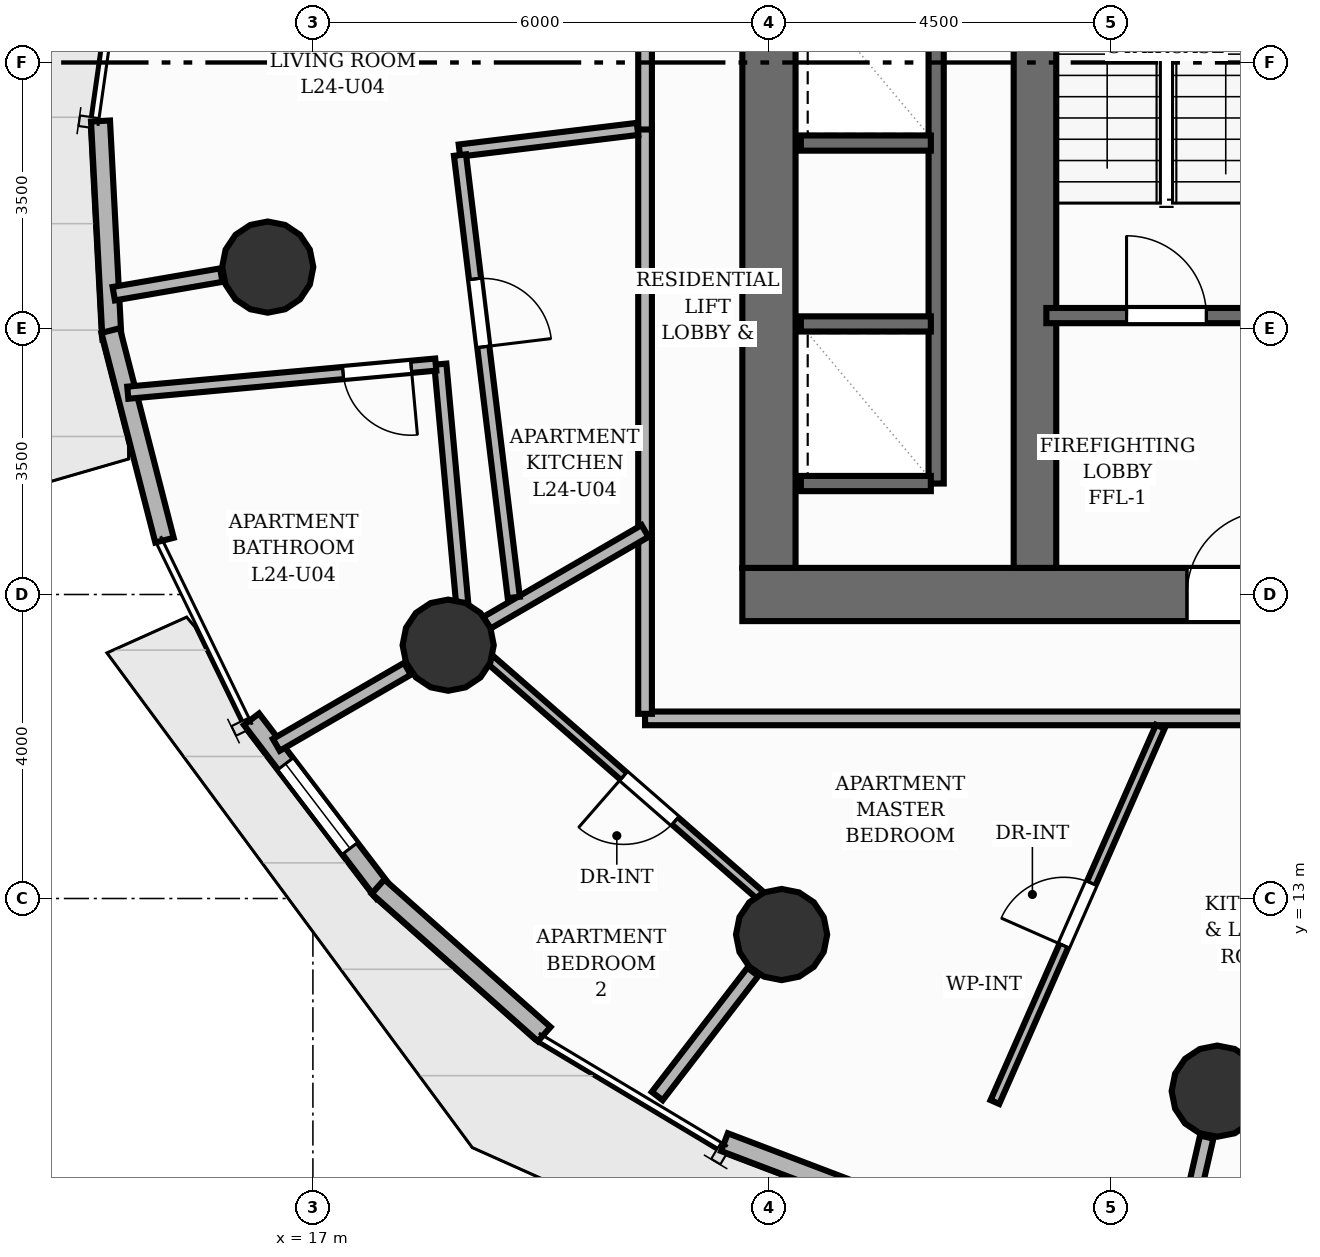
"""IFC4 building model, lengths in metres.
Left out: names, types, materials, properties, quantities, classifications, styles, units other than length and angle.
Written with IfcOpenShell. Run it as: python <this file> out.ifc"""

import sys

from ifc_helpers import new_model, si_unit, direction, frame, frame_2d, origin, origin_2d, place, context, subcontext, project, spatial, rectangle, circle, extrude, element, fill, save


model = new_model("IFC4")
c1 = context("Model", 3, precision=1e-05, world=origin(), true_north=direction((0.0, 1.0)))
c2 = subcontext(c1, "Body", "Model", "MODEL_VIEW")
j1 = project(units=[si_unit("LENGTHUNIT", "METRE"), si_unit("PLANEANGLEUNIT", "RADIAN")], contexts=[c1])
p1 = place(None, origin())
s1 = spatial("IfcSite", under=j1, at=p1, CompositionType="ELEMENT")
p2 = place(p1, origin())
s2 = spatial("IfcBuilding", under=s1, at=p2, CompositionType="ELEMENT")
p3 = place(p2, frame((0.0, 0.0, 83.68)))
s3 = spatial("IfcBuildingStorey", under=s2, at=p3, CompositionType="ELEMENT", Elevation=83.68)
p4 = place(p3, frame((22.65, 17.0, 0.0), z_axis=(0.0, 0.0, 1.0), x_axis=(1.0, 0.0, 0.0)))
e1 = element("IfcWall", 1, at=p4, inside=s3, PredefinedType="SHEAR", context=c2, shape_type="SweptSolid", body=[
    extrude(rectangle(XDim=18.7, YDim=0.7, at=frame_2d((9.35, 0.0))), origin(), (0.0, 0.0, 1.0), 3.2),
])
p5 = place(p4, frame((5.85, 0.0, 0.0)))
e2 = element("IfcOpeningElement", 2, at=p5, cuts=e1, PredefinedType="OPENING", context=c2, shape_type="SweptSolid", body=[
    extrude(rectangle(XDim=1.1, YDim=2.15, at=frame_2d((0.55, 1.075))), frame((0.0, 0.36, 0.0), z_axis=(0.0, -1.0, 0.0), x_axis=(1.0, 0.0, 0.0)), (0.0, 0.0, 1.0), 0.72),
])
p6 = place(p4, frame((9.4, 0.0, 0.0)))
e3 = element("IfcOpeningElement", 3, at=p6, cuts=e1, PredefinedType="OPENING", context=c2, shape_type="SweptSolid", body=[
    extrude(rectangle(XDim=0.9, YDim=2.1, at=frame_2d((0.45, 1.05))), frame((0.0, 0.36, 0.0), z_axis=(0.0, -1.0, 0.0), x_axis=(1.0, 0.0, 0.0)), (0.0, 0.0, 1.0), 0.72),
])
p7 = place(p3, frame((23.0, 17.35, 0.0), z_axis=(0.0, 0.0, 1.0), x_axis=(0.0, 1.0, 0.0)))
e4 = element("IfcWall", 4, at=p7, inside=s3, PredefinedType="SHEAR", context=c2, shape_type="SweptSolid", body=[
    extrude(rectangle(XDim=13.3, YDim=0.7, at=frame_2d((6.65, 0.0))), origin(), (0.0, 0.0, 1.0), 3.2),
])
p8 = place(p3, frame((26.5, 17.35, 0.0), z_axis=(0.0, 0.0, 1.0), x_axis=(0.0, 1.0, 0.0)))
e5 = element("IfcWall", 5, at=p8, inside=s3, PredefinedType="SHEAR", context=c2, shape_type="SweptSolid", body=[
    extrude(rectangle(XDim=13.3, YDim=0.56, at=frame_2d((6.65, 0.0))), origin(), (0.0, 0.0, 1.0), 3.2),
])
for number, where, z_axis, x_axis in (
    (6, (16.406, 21.308, 0.0), (0.0, 0.0, 1.0), (1.0, 0.0, 0.0)),
    (7, (18.78, 16.333, 0.0), (0.0, 0.0, 1.0), (1.0, 0.0, 0.0)),
    (8, (23.167, 12.526, 0.0), (0.0, 0.0, 1.0), (1.0, 0.0, 0.0)),
    (9, (28.898, 10.465, 0.0), (0.0, 0.0, 1.0), (1.0, 0.0, 0.0)),
):
    element("IfcColumn", number, at=place(p3, frame(where, z_axis=z_axis, x_axis=x_axis)), inside=s3, PredefinedType="COLUMN", context=c2, shape_type="SweptSolid", body=[
        extrude(circle(Radius=0.6, at=origin_2d()), origin(), (0.0, 0.0, 1.0), 3.2),
    ])
p9 = place(p3, frame((14.356, 20.36, 0.0), z_axis=(0.0, 0.0, 1.0), x_axis=(-0.052411702269, 0.998625562193, 0.0)))
e10 = element("IfcWall", 10, at=p9, inside=s3, PredefinedType="SOLIDWALL", context=c2, shape_type="SweptSolid", body=[
    extrude(rectangle(XDim=2.874, YDim=0.25, at=frame_2d((1.437, 0.0))), origin(), (0.0, 0.0, 1.0), 2.96),
])
p10 = place(p3, frame((15.047, 17.715, 0.0), z_axis=(0.0, 0.0, 1.0), x_axis=(-0.248825035787, 0.96854845081, 0.0)))
e11 = element("IfcWall", 11, at=p10, inside=s3, PredefinedType="SOLIDWALL", context=c2, shape_type="SweptSolid", body=[
    extrude(rectangle(XDim=2.847, YDim=0.25, at=frame_2d((1.424, 0.0))), origin(), (0.0, 0.0, 1.0), 2.96),
])
p11 = place(p3, frame((17.935, 13.073, 0.0), z_axis=(0.0, 0.0, 1.0), x_axis=(-0.606166055027, 0.795338112838, 0.0)))
e12 = element("IfcWall", 12, at=p11, inside=s3, PredefinedType="SOLIDWALL", context=c2, shape_type="SweptSolid", body=[
    extrude(rectangle(XDim=2.874, YDim=0.25, at=frame_2d((1.437, 0.0))), origin(), (0.0, 0.0, 1.0), 2.96),
])
p12 = place(p11, frame((0.737, 0.0, 0.85)))
e13 = element("IfcOpeningElement", 13, at=p12, cuts=e12, PredefinedType="OPENING", context=c2, shape_type="SweptSolid", body=[
    extrude(rectangle(XDim=1.4, YDim=1.37, at=frame_2d((0.7, 0.685))), frame((0.0, 0.135, 0.0), z_axis=(0.0, -1.0, 0.0), x_axis=(1.0, 0.0, 0.0)), (0.0, 0.0, 1.0), 0.27),
])
p13 = place(p3, frame((20.043, 11.216, 0.0), z_axis=(0.0, 0.0, 1.0), x_axis=(-0.747828492436, 0.663891968547, 0.0)))
e14 = element("IfcWall", 14, at=p13, inside=s3, PredefinedType="SOLIDWALL", context=c2, shape_type="SweptSolid", body=[
    extrude(rectangle(XDim=2.923, YDim=0.25, at=frame_2d((1.461, 0.0))), origin(), (0.0, 0.0, 1.0), 2.96),
])
p14 = place(p3, frame((25.276, 8.707, 0.0), z_axis=(0.0, 0.0, 1.0), x_axis=(-0.934815891493, 0.355132720277, 0.0)))
e15 = element("IfcWall", 15, at=p14, inside=s3, PredefinedType="SOLIDWALL", context=c2, shape_type="SweptSolid", body=[
    extrude(rectangle(XDim=3.061, YDim=0.25, at=frame_2d((1.53, 0.0))), origin(), (0.0, 0.0, 1.0), 2.96),
])
p15 = place(p3, frame((26.65, 20.67, 0.0), z_axis=(0.0, 0.0, 1.0), x_axis=(1.0, 0.0, 0.0)))
e16 = element("IfcWall", 16, at=p15, inside=s3, PredefinedType="SHEAR", context=c2, shape_type="SweptSolid", body=[
    extrude(rectangle(XDim=3.24, YDim=0.2, at=frame_2d((1.62, 0.0))), origin(), (0.0, 0.0, 1.0), 3.2),
])
p16 = place(p15, frame((1.055, 0.0, 0.0)))
e17 = element("IfcOpeningElement", 17, at=p16, cuts=e16, PredefinedType="OPENING", context=c2, shape_type="SweptSolid", body=[
    extrude(rectangle(XDim=1.05, YDim=2.15, at=frame_2d((0.525, 1.075))), frame((0.0, 0.11, 0.0), z_axis=(0.0, -1.0, 0.0), x_axis=(1.0, 0.0, 0.0)), (0.0, 0.0, 1.0), 0.22),
])
p17 = place(p3, frame((25.2, 18.46, 0.0), z_axis=(0.0, 0.0, 1.0), x_axis=(0.0, 1.0, 0.0)))
e18 = element("IfcWall", 18, at=p17, inside=s3, PredefinedType="SHEAR", context=c2, shape_type="SweptSolid", body=[
    extrude(rectangle(XDim=11.08, YDim=0.2, at=frame_2d((5.54, 0.0))), origin(), (0.0, 0.0, 1.0), 3.2),
])
for number, where, z_axis, x_axis in (
    (19, (23.42, 18.46, 0.0), (0.0, 0.0, 1.0), (1.0, 0.0, 0.0)),
    (20, (23.42, 20.56, 0.0), (0.0, 0.0, 1.0), (1.0, 0.0, 0.0)),
    (21, (23.42, 22.94, 0.0), (0.0, 0.0, 1.0), (1.0, 0.0, 0.0)),
):
    element("IfcWall", number, at=place(p3, frame(where, z_axis=z_axis, x_axis=x_axis)), inside=s3, PredefinedType="SHEAR", context=c2, shape_type="SweptSolid", body=[
        extrude(rectangle(XDim=1.71, YDim=0.2, at=frame_2d((0.855, 0.0))), origin(), (0.0, 0.0, 1.0), 3.2),
    ])
p18 = place(p3, frame((15.794, 21.202, 0.0), z_axis=(0.0, 0.0, 1.0), x_axis=(-0.985402123708, -0.170242928172, 0.0)))
e22 = element("IfcWall", 22, at=p18, inside=s3, PredefinedType="PARTITIONING", context=c2, shape_type="SweptSolid", body=[
    extrude(rectangle(XDim=1.436, YDim=0.18, at=frame_2d((0.718, 0.0))), origin(), (0.0, 0.0, 1.0), 2.261),
])
p19 = place(p3, frame((18.243, 16.022, 0.0), z_axis=(0.0, 0.0, 1.0), x_axis=(-0.865046065875, -0.501692439563, 0.0)))
e23 = element("IfcWall", 23, at=p19, inside=s3, PredefinedType="PARTITIONING", context=c2, shape_type="SweptSolid", body=[
    extrude(rectangle(XDim=1.994, YDim=0.18, at=frame_2d((0.997, 0.0))), origin(), (0.0, 0.0, 1.0), 2.261),
])
p20 = place(p3, frame((22.788, 12.034, 0.0), z_axis=(0.0, 0.0, 1.0), x_axis=(-0.609991040385, -0.792408310564, 0.0)))
e24 = element("IfcWall", 24, at=p20, inside=s3, PredefinedType="PARTITIONING", context=c2, shape_type="SweptSolid", body=[
    extrude(rectangle(XDim=2.062, YDim=0.18, at=frame_2d((1.031, 0.0))), origin(), (0.0, 0.0, 1.0), 2.261),
])
p21 = place(p3, frame((28.76, 9.861, 0.0), z_axis=(0.0, 0.0, 1.0), x_axis=(-0.223359217097, -0.974736200281, 0.0)))
e25 = element("IfcWall", 25, at=p21, inside=s3, PredefinedType="PARTITIONING", context=c2, shape_type="SweptSolid", body=[
    extrude(rectangle(XDim=1.712, YDim=0.18, at=frame_2d((0.856, 0.0))), origin(), (0.0, 0.0, 1.0), 2.261),
])
p22 = place(p3, frame((41.695, 15.37, 0.0), z_axis=(0.0, 0.0, 1.0), x_axis=(-1.0, 0.0, 0.0)))
e26 = element("IfcWall", 26, at=p22, inside=s3, PredefinedType="PARTITIONING", context=c2, shape_type="SweptSolid", body=[
    extrude(rectangle(XDim=20.325, YDim=0.18, at=frame_2d((10.163, 0.0))), origin(), (0.0, 0.0, 1.0), 2.955),
])
p23 = place(p22, frame((11.424, 0.0, 0.0)))
e27 = element("IfcOpeningElement", 27, at=p23, cuts=e26, PredefinedType="OPENING", context=c2, shape_type="SweptSolid", body=[
    extrude(rectangle(XDim=1.05, YDim=2.15, at=frame_2d((0.525, 1.075))), frame((0.0, 0.1, 0.0), z_axis=(0.0, -1.0, 0.0), x_axis=(1.0, 0.0, 0.0)), (0.0, 0.0, 1.0), 0.2),
])
p24 = place(p3, frame((21.37, 15.43, 0.0), z_axis=(0.0, 0.0, 1.0), x_axis=(0.0, 1.0, 0.0)))
e28 = element("IfcWall", 28, at=p24, inside=s3, PredefinedType="PARTITIONING", context=c2, shape_type="SweptSolid", body=[
    extrude(rectangle(XDim=7.727, YDim=0.18, at=frame_2d((3.863, 0.0))), origin(), (0.0, 0.0, 1.0), 2.955),
])
p25 = place(p3, frame((21.37, 23.118, 0.0), z_axis=(0.0, 0.0, 1.0), x_axis=(0.0, 1.0, 0.0)))
e29 = element("IfcWall", 29, at=p25, inside=s3, PredefinedType="PARTITIONING", context=c2, shape_type="SweptSolid", body=[
    extrude(rectangle(XDim=4.154, YDim=0.18, at=frame_2d((2.077, 0.0))), origin(), (0.0, 0.0, 1.0), 2.955),
])
p26 = place(p25, frame((1.552, 0.0, 0.0)))
e30 = element("IfcOpeningElement", 30, at=p26, cuts=e29, PredefinedType="OPENING", context=c2, shape_type="SweptSolid", body=[
    extrude(rectangle(XDim=1.05, YDim=2.15, at=frame_2d((0.525, 1.075))), frame((0.0, 0.1, 0.0), z_axis=(0.0, -1.0, 0.0), x_axis=(1.0, 0.0, 0.0)), (0.0, 0.0, 1.0), 0.2),
])
p27 = place(p3, frame((25.973, 10.322, 0.0), z_axis=(0.0, 0.0, 1.0), x_axis=(0.403235845427, 0.91509608947, 0.0)))
e31 = element("IfcWall", 31, at=p27, inside=s3, PredefinedType="PARTITIONING", context=c2, shape_type="SweptSolid", body=[
    extrude(rectangle(XDim=5.396, YDim=0.125, at=frame_2d((2.698, 0.0))), origin(), (0.0, 0.0, 1.0), 2.955),
])
p28 = place(p27, frame((2.248, 0.0, 0.0)))
e32 = element("IfcOpeningElement", 32, at=p28, cuts=e31, PredefinedType="OPENING", context=c2, shape_type="SweptSolid", body=[
    extrude(rectangle(XDim=0.9, YDim=2.1, at=frame_2d((0.45, 1.05))), frame((0.0, 0.073, 0.0), z_axis=(0.0, -1.0, 0.0), x_axis=(1.0, 0.0, 0.0)), (0.0, 0.0, 1.0), 0.145),
])
p29 = place(p3, frame((22.888, 13.04, 0.0), z_axis=(0.0, 0.0, 1.0), x_axis=(-0.753425123405, 0.657533712765, 0.0)))
e33 = element("IfcWall", 33, at=p29, inside=s3, PredefinedType="PARTITIONING", context=c2, shape_type="SweptSolid", body=[
    extrude(rectangle(XDim=4.72, YDim=0.125, at=frame_2d((2.36, 0.0))), origin(), (0.0, 0.0, 1.0), 2.404),
])
p30 = place(p29, frame((1.49, 0.0, 0.0)))
e34 = element("IfcOpeningElement", 34, at=p30, cuts=e33, PredefinedType="OPENING", context=c2, shape_type="SweptSolid", body=[
    extrude(rectangle(XDim=0.9, YDim=2.1, at=frame_2d((0.45, 1.05))), frame((0.0, 0.073, 0.0), z_axis=(0.0, -1.0, 0.0), x_axis=(1.0, 0.0, 0.0)), (0.0, 0.0, 1.0), 0.145),
])
p31 = place(p3, frame((19.288, 16.628, 0.0), z_axis=(0.0, 0.0, 1.0), x_axis=(0.86502326608, 0.501731750182, 0.0)))
e35 = element("IfcWall", 35, at=p31, inside=s3, PredefinedType="PARTITIONING", context=c2, shape_type="SweptSolid", body=[
    extrude(rectangle(XDim=2.407, YDim=0.18, at=frame_2d((1.204, 0.0))), origin(), (0.0, 0.0, 1.0), 2.261),
])
p32 = place(p3, frame((18.964, 16.887, 0.0), z_axis=(0.0, 0.0, 1.0), x_axis=(-0.091023836021, 0.995848714051, 0.0)))
e36 = element("IfcWall", 36, at=p32, inside=s3, PredefinedType="PLUMBINGWALL", context=c2, shape_type="SweptSolid", body=[
    extrude(rectangle(XDim=3.157, YDim=0.16, at=frame_2d((1.579, 0.0))), origin(), (0.0, 0.0, 1.0), 2.955),
])
p33 = place(p3, frame((18.616, 20.025, 0.0), z_axis=(0.0, 0.0, 1.0), x_axis=(-0.995848823867, -0.091022634561, 0.0)))
e37 = element("IfcWall", 37, at=p33, inside=s3, PredefinedType="PLUMBINGWALL", context=c2, shape_type="SweptSolid", body=[
    extrude(rectangle(XDim=4.069, YDim=0.16, at=frame_2d((2.034, 0.0))), origin(), (0.0, 0.0, 1.0), 2.641),
])
p34 = place(p33, frame((0.324, 0.0, 0.0)))
e38 = element("IfcOpeningElement", 38, at=p34, cuts=e37, PredefinedType="OPENING", context=c2, shape_type="SweptSolid", body=[
    extrude(rectangle(XDim=0.9, YDim=2.1, at=frame_2d((0.45, 1.05))), frame((0.0, 0.09, 0.0), z_axis=(0.0, -1.0, 0.0), x_axis=(1.0, 0.0, 0.0)), (0.0, 0.0, 1.0), 0.18),
])
p35 = place(p3, frame((21.271, 23.126, 0.0), z_axis=(0.0, 0.0, 1.0), x_axis=(-0.992687653986, -0.120711315224, 0.0)))
e39 = element("IfcWall", 39, at=p35, inside=s3, PredefinedType="PLUMBINGWALL", context=c2, shape_type="SweptSolid", body=[
    extrude(rectangle(XDim=2.36, YDim=0.16, at=frame_2d((1.18, 0.0))), origin(), (0.0, 0.0, 1.0), 2.955),
])
p36 = place(p3, frame((18.935, 22.782, 0.0), z_axis=(0.0, 0.0, 1.0), x_axis=(0.120703145243, -0.992688647426, 0.0)))
e40 = element("IfcWall", 40, at=p36, inside=s3, PredefinedType="PLUMBINGWALL", context=c2, shape_type="SweptSolid", body=[
    extrude(rectangle(XDim=5.864, YDim=0.16, at=frame_2d((2.932, 0.0))), origin(), (0.0, 0.0, 1.0), 2.955),
])
p37 = place(p36, frame((1.642, 0.0, 0.0)))
e41 = element("IfcOpeningElement", 41, at=p37, cuts=e40, PredefinedType="OPENING", context=c2, shape_type="SweptSolid", body=[
    extrude(rectangle(XDim=0.9, YDim=2.1, at=frame_2d((0.45, 1.05))), frame((0.0, 0.09, 0.0), z_axis=(0.0, -1.0, 0.0), x_axis=(1.0, 0.0, 0.0)), (0.0, 0.0, 1.0), 0.18),
])
p38 = place(p12, origin())
e42 = element("IfcWindow", 42, at=p38, inside=s3, PartitioningType="SINGLE_PANEL", PredefinedType="WINDOW", context=c2, shape_type="SweptSolid", body=[
    extrude(rectangle(XDim=1.4, YDim=1.37, at=frame_2d((0.7, 0.685))), frame((0.0, 0.03, 0.0), z_axis=(0.0, -1.0, 0.0), x_axis=(1.0, 0.0, 0.0)), (0.0, 0.0, 1.0), 0.06),
])
fill(e13, e42)
p39 = place(p16, origin())
e43 = element("IfcDoor", 43, at=p39, inside=s3, OperationType="SINGLE_SWING_LEFT", PredefinedType="DOOR", context=c2, shape_type="SweptSolid", body=[
    extrude(rectangle(XDim=1.05, YDim=2.15, at=frame_2d((0.525, 1.075))), frame((0.0, 0.025, 0.0), z_axis=(0.0, -1.0, 0.0), x_axis=(1.0, 0.0, 0.0)), (0.0, 0.0, 1.0), 0.05),
])
fill(e17, e43)
p40 = place(p5, origin())
e44 = element("IfcDoor", 44, at=p40, inside=s3, OperationType="SINGLE_SWING_RIGHT", PredefinedType="DOOR", context=c2, shape_type="SweptSolid", body=[
    extrude(rectangle(XDim=1.1, YDim=2.15, at=frame_2d((0.55, 1.075))), frame((0.0, 0.025, 0.0), z_axis=(0.0, -1.0, 0.0), x_axis=(1.0, 0.0, 0.0)), (0.0, 0.0, 1.0), 0.05),
])
fill(e2, e44)
p41 = place(p28, origin())
e45 = element("IfcDoor", 45, at=p41, inside=s3, OperationType="SINGLE_SWING_LEFT", PredefinedType="DOOR", context=c2, shape_type="SweptSolid", body=[
    extrude(rectangle(XDim=0.9, YDim=2.1, at=frame_2d((0.45, 1.05))), frame((0.0, 0.025, 0.0), z_axis=(0.0, -1.0, 0.0), x_axis=(1.0, 0.0, 0.0)), (0.0, 0.0, 1.0), 0.05),
])
fill(e32, e45)
p42 = place(p30, origin())
e46 = element("IfcDoor", 46, at=p42, inside=s3, OperationType="SINGLE_SWING_RIGHT", PredefinedType="DOOR", context=c2, shape_type="SweptSolid", body=[
    extrude(rectangle(XDim=0.9, YDim=2.1, at=frame_2d((0.45, 1.05))), frame((0.0, 0.025, 0.0), z_axis=(0.0, -1.0, 0.0), x_axis=(1.0, 0.0, 0.0)), (0.0, 0.0, 1.0), 0.05),
])
fill(e34, e46)
p43 = place(p34, origin())
e47 = element("IfcDoor", 47, at=p43, inside=s3, OperationType="SINGLE_SWING_LEFT", PredefinedType="DOOR", context=c2, shape_type="SweptSolid", body=[
    extrude(rectangle(XDim=0.9, YDim=2.1, at=frame_2d((0.45, 1.05))), frame((0.0, 0.025, 0.0), z_axis=(0.0, -1.0, 0.0), x_axis=(1.0, 0.0, 0.0)), (0.0, 0.0, 1.0), 0.05),
])
fill(e38, e47)
p44 = place(p37, origin())
e48 = element("IfcDoor", 48, at=p44, inside=s3, OperationType="SINGLE_SWING_RIGHT", PredefinedType="DOOR", context=c2, shape_type="SweptSolid", body=[
    extrude(rectangle(XDim=0.9, YDim=2.1, at=frame_2d((0.45, 1.05))), frame((0.0, 0.025, 0.0), z_axis=(0.0, -1.0, 0.0), x_axis=(1.0, 0.0, 0.0)), (0.0, 0.0, 1.0), 0.05),
])
fill(e41, e48)
save(model, sys.argv[1])
